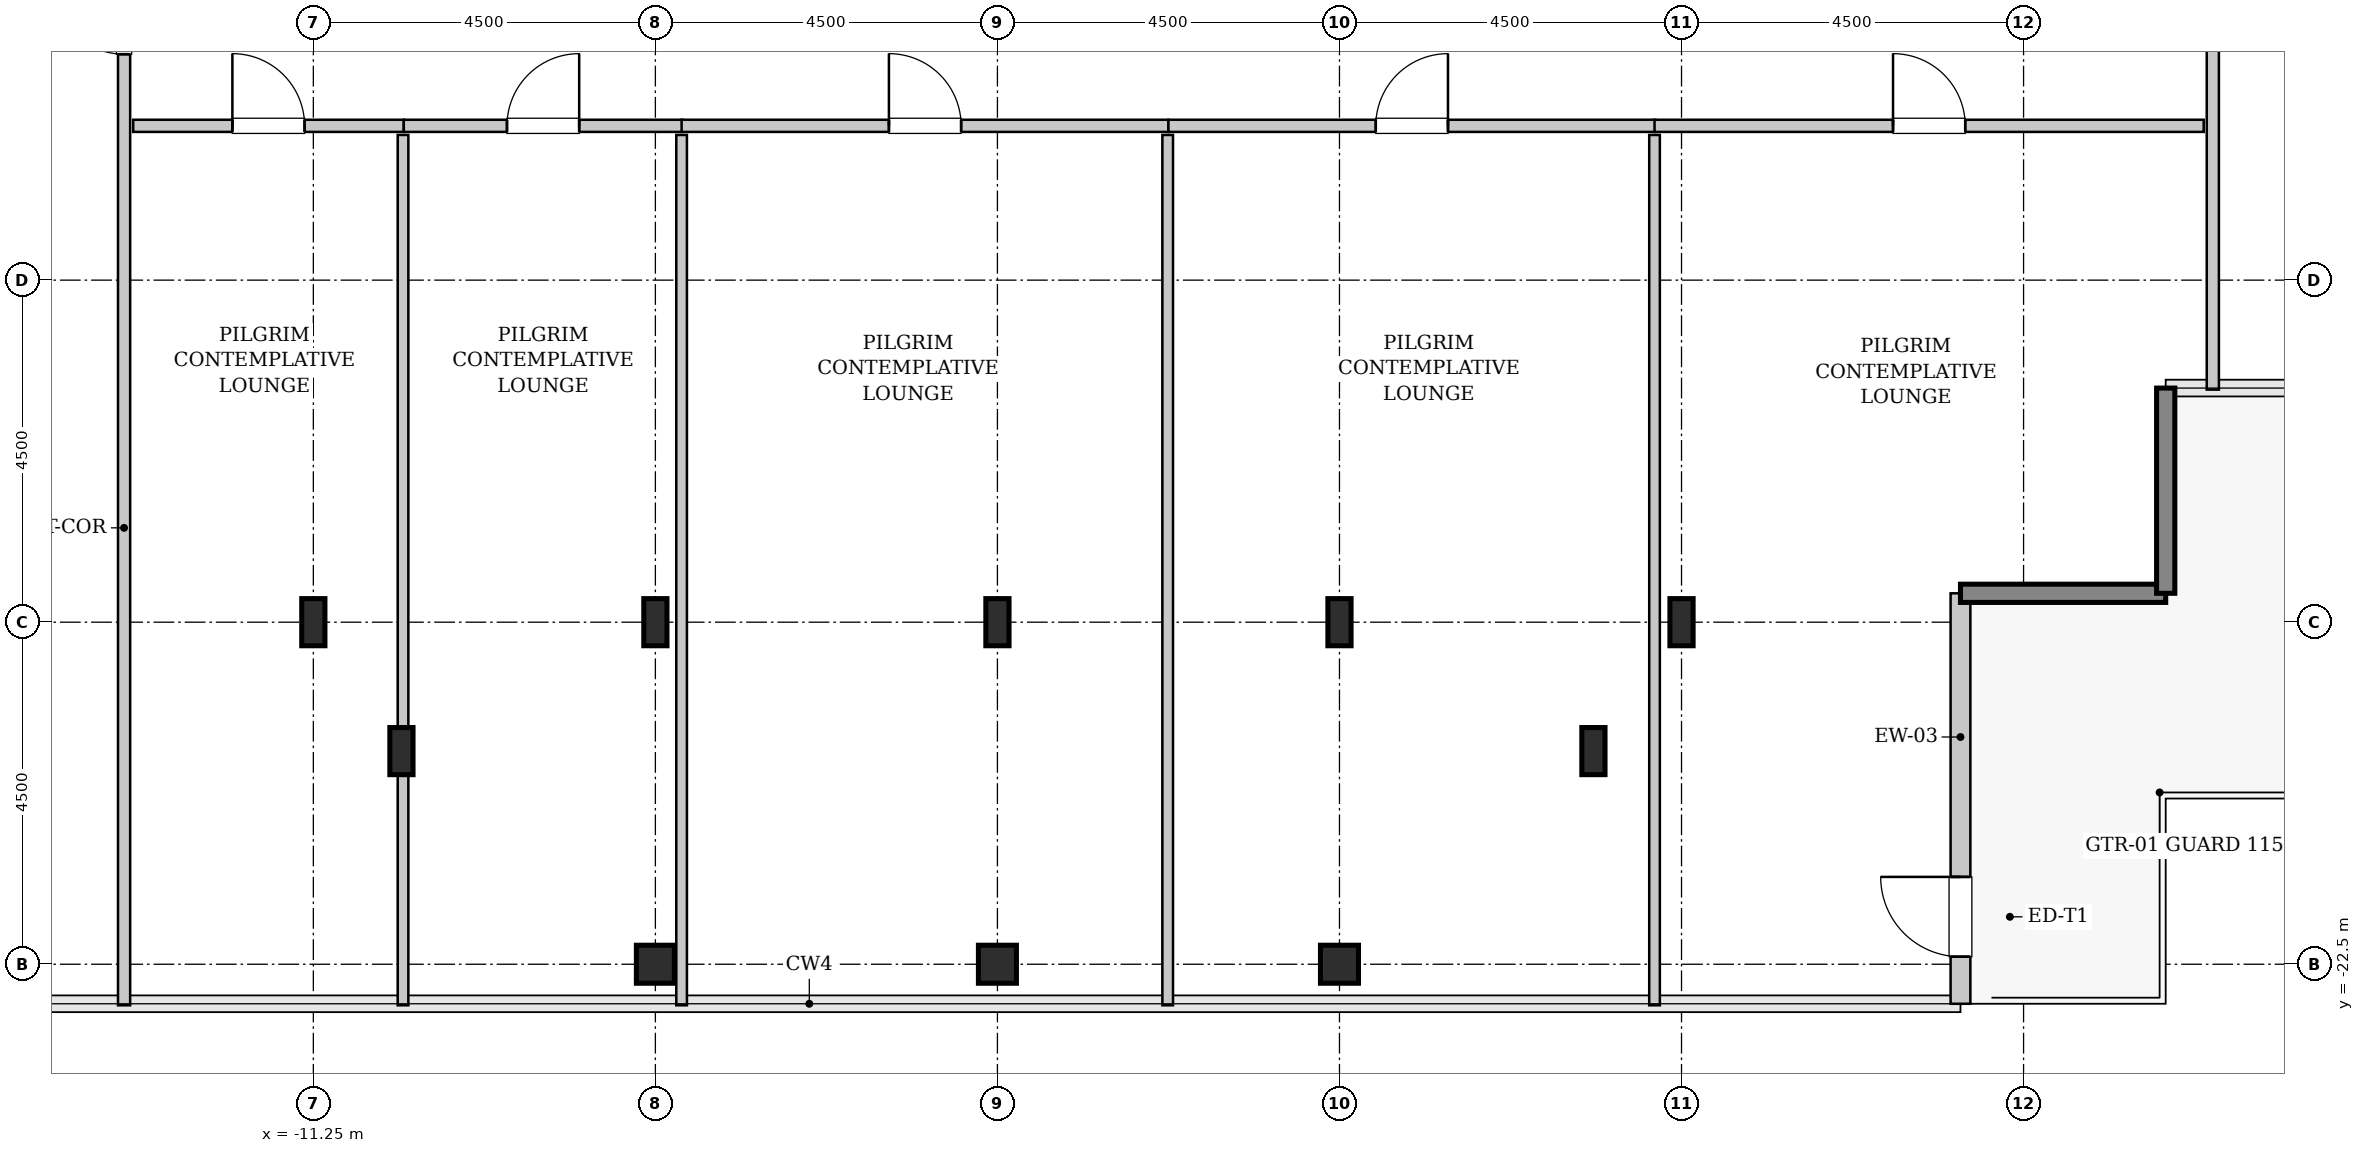
"""IFC4 building model, lengths in metres.
Left out: names, types, materials, properties, quantities, classifications, styles, units other than length and angle.
Written with IfcOpenShell. Run it as: python <this file> out.ifc"""

import sys

from ifc_helpers import new_model, si_unit, direction, frame, frame_2d, origin, origin_2d, place, context, subcontext, project, spatial, rectangle, hollow_rectangle, i_section, extrude, source, transform, mapped, element, fill, save


model = new_model("IFC4")
c1 = context("Model", 3, precision=1e-05, world=origin(), true_north=direction((0.0, 1.0)))
c2 = subcontext(c1, "Body", "Model", "MODEL_VIEW")
j1 = project(units=[si_unit("LENGTHUNIT", "METRE"), si_unit("PLANEANGLEUNIT", "RADIAN")], contexts=[c1])
p1 = place(None, origin())
s1 = spatial("IfcSite", under=j1, at=p1, CompositionType="ELEMENT")
p2 = place(p1, origin())
s2 = spatial("IfcBuilding", under=s1, at=p2, CompositionType="ELEMENT")
p3 = place(p2, frame((0.0, 0.0, 298.8)))
s3 = spatial("IfcBuildingStorey", under=s2, at=p3, CompositionType="ELEMENT", Elevation=298.8)
m1 = source(origin(), c2, "Body", "SweptSolid", [
    extrude(i_section(OverallWidth=0.305, OverallDepth=0.62, WebThickness=0.021, FlangeThickness=0.04, FilletRadius=0.027, at=origin_2d()), origin(), (0.0, 0.0, 1.0), 3.8),
])
for number, where, z_axis, x_axis in (
    (1, (-11.25, -18.0, 0.0), (0.0, 0.0, 1.0), (1.0, 0.0, 0.0)),
    (2, (-10.091, -19.696, 0.0), (0.0, 0.0, 1.0), (1.0, 0.0, 0.0)),
):
    element("IfcColumn", number, at=place(p3, frame(where, z_axis=z_axis, x_axis=x_axis)), inside=s3, PredefinedType="COLUMN", context=c2, shape_type="MappedRepresentation", body=[
        mapped(m1, transform((0.0, 0.0, 0.0), x_axis=(1.0, 0.0, 0.0), y_axis=(0.0, 1.0, 0.0), z_axis=(0.0, 0.0, 1.0), scale=1.0)),
    ])
m2 = source(origin(), c2, "Body", "SweptSolid", [
    extrude(hollow_rectangle(XDim=0.5, YDim=0.5, WallThickness=0.025, InnerFilletRadius=0.025, OuterFilletRadius=0.05, at=origin_2d()), origin(), (0.0, 0.0, 1.0), 3.8),
])
p4 = place(p3, frame((-6.75, -22.5, 0.0), z_axis=(0.0, 0.0, 1.0), x_axis=(1.0, 0.0, 0.0)))
e3 = element("IfcColumn", 3, at=p4, inside=s3, PredefinedType="COLUMN", context=c2, shape_type="MappedRepresentation", body=[
    mapped(m2, transform((0.0, 0.0, 0.0), x_axis=(1.0, 0.0, 0.0), y_axis=(0.0, 1.0, 0.0), z_axis=(0.0, 0.0, 1.0), scale=1.0)),
])
p5 = place(p3, frame((-6.75, -18.0, 0.0), z_axis=(0.0, 0.0, 1.0), x_axis=(1.0, 0.0, 0.0)))
e4 = element("IfcColumn", 4, at=p5, inside=s3, PredefinedType="COLUMN", context=c2, shape_type="MappedRepresentation", body=[
    mapped(m1, transform((0.0, 0.0, 0.0), x_axis=(1.0, 0.0, 0.0), y_axis=(0.0, 1.0, 0.0), z_axis=(0.0, 0.0, 1.0), scale=1.0)),
])
p6 = place(p3, frame((-2.25, -22.5, 0.0), z_axis=(0.0, 0.0, 1.0), x_axis=(1.0, 0.0, 0.0)))
e5 = element("IfcColumn", 5, at=p6, inside=s3, PredefinedType="COLUMN", context=c2, shape_type="MappedRepresentation", body=[
    mapped(m2, transform((0.0, 0.0, 0.0), x_axis=(1.0, 0.0, 0.0), y_axis=(0.0, 1.0, 0.0), z_axis=(0.0, 0.0, 1.0), scale=1.0)),
])
p7 = place(p3, frame((-2.25, -18.0, 0.0), z_axis=(0.0, 0.0, 1.0), x_axis=(1.0, 0.0, 0.0)))
e6 = element("IfcColumn", 6, at=p7, inside=s3, PredefinedType="COLUMN", context=c2, shape_type="MappedRepresentation", body=[
    mapped(m1, transform((0.0, 0.0, 0.0), x_axis=(1.0, 0.0, 0.0), y_axis=(0.0, 1.0, 0.0), z_axis=(0.0, 0.0, 1.0), scale=1.0)),
])
p8 = place(p3, frame((2.25, -22.5, 0.0), z_axis=(0.0, 0.0, 1.0), x_axis=(1.0, 0.0, 0.0)))
e7 = element("IfcColumn", 7, at=p8, inside=s3, PredefinedType="COLUMN", context=c2, shape_type="MappedRepresentation", body=[
    mapped(m2, transform((0.0, 0.0, 0.0), x_axis=(1.0, 0.0, 0.0), y_axis=(0.0, 1.0, 0.0), z_axis=(0.0, 0.0, 1.0), scale=1.0)),
])
for number, where, z_axis, x_axis in (
    (8, (2.25, -18.0, 0.0), (0.0, 0.0, 1.0), (1.0, 0.0, 0.0)),
    (9, (5.591, -19.696, 0.0), (0.0, 0.0, 1.0), (1.0, 0.0, 0.0)),
    (10, (6.75, -18.0, 0.0), (0.0, 0.0, 1.0), (1.0, 0.0, 0.0)),
):
    element("IfcColumn", number, at=place(p3, frame(where, z_axis=z_axis, x_axis=x_axis)), inside=s3, PredefinedType="COLUMN", context=c2, shape_type="MappedRepresentation", body=[
        mapped(m1, transform((0.0, 0.0, 0.0), x_axis=(1.0, 0.0, 0.0), y_axis=(0.0, 1.0, 0.0), z_axis=(0.0, 0.0, 1.0), scale=1.0)),
    ])
m3 = source(origin(), c2, "Body", "SweptSolid", [
    extrude(rectangle(XDim=5.4, YDim=0.26, at=frame_2d((2.7, 0.0))), origin(), (0.0, 0.0, 1.0), 3.55),
])
p9 = place(p3, frame((10.42, -23.02, 0.0), z_axis=(0.0, 0.0, 1.0), x_axis=(0.0, 1.0, 0.0)))
e11 = element("IfcWall", 11, at=p9, inside=s3, PredefinedType="SOLIDWALL", context=c2, shape_type="MappedRepresentation", body=[
    mapped(m3, transform((0.0, 0.0, 0.0), x_axis=(1.0, 0.0, 0.0), y_axis=(0.0, 1.0, 0.0), z_axis=(0.0, 0.0, 1.0), scale=1.0)),
])
p10 = place(p9, frame((0.619, 0.0, 0.0)))
e12 = element("IfcOpeningElement", 12, at=p10, cuts=e11, PredefinedType="OPENING", context=c2, shape_type="SweptSolid", body=[
    extrude(rectangle(XDim=1.05, YDim=2.2, at=frame_2d((0.525, 1.1))), frame((0.0, 0.14, 0.0), z_axis=(0.0, -1.0, 0.0), x_axis=(1.0, 0.0, 0.0)), (0.0, 0.0, 1.0), 0.28),
])
m4 = source(origin(), c2, "Body", "SweptSolid", [
    extrude(rectangle(XDim=2.7, YDim=0.24, at=frame_2d((1.35, 0.0))), origin(), (0.0, 0.0, 1.0), 3.55),
])
for number, where, z_axis, x_axis in (
    (13, (10.42, -17.62, 0.0), (0.0, 0.0, 1.0), (1.0, 0.0, 0.0)),
    (14, (13.12, -17.62, 0.0), (0.0, 0.0, 1.0), (0.0, 1.0, 0.0)),
):
    element("IfcWall", number, at=place(p3, frame(where, z_axis=z_axis, x_axis=x_axis)), inside=s3, PredefinedType="SHEAR", context=c2, shape_type="MappedRepresentation", body=[
        mapped(m4, transform((0.0, 0.0, 0.0), x_axis=(1.0, 0.0, 0.0), y_axis=(0.0, 1.0, 0.0), z_axis=(0.0, 0.0, 1.0), scale=1.0)),
    ])
m5 = source(origin(), c2, "Body", "SweptSolid", [
    extrude(rectangle(XDim=14.445, YDim=0.16, at=frame_2d((7.223, 0.0))), origin(), (0.0, 0.0, 1.0), 3.535),
])
p11 = place(p3, frame((-13.74, -23.04, 0.0), z_axis=(0.0, 0.0, 1.0), x_axis=(0.0, 1.0, 0.0)))
e15 = element("IfcWall", 15, at=p11, inside=s3, PredefinedType="PARTITIONING", context=c2, shape_type="MappedRepresentation", body=[
    mapped(m5, transform((0.0, 0.0, 0.0), x_axis=(1.0, 0.0, 0.0), y_axis=(0.0, 1.0, 0.0), z_axis=(0.0, 0.0, 1.0), scale=1.0)),
])
p12 = place(p11, frame((12.512, 0.0, 0.0)))
e16 = element("IfcOpeningElement", 16, at=p12, cuts=e15, PredefinedType="OPENING", context=c2, shape_type="SweptSolid", body=[
    extrude(rectangle(XDim=0.95, YDim=2.1, at=frame_2d((0.475, 1.05))), frame((0.0, 0.09, 0.0), z_axis=(0.0, -1.0, 0.0), x_axis=(1.0, 0.0, 0.0)), (0.0, 0.0, 1.0), 0.18),
])
m6 = source(origin(), c2, "Body", "SweptSolid", [
    extrude(rectangle(XDim=9.145, YDim=0.16, at=frame_2d((4.573, 0.0))), origin(), (0.0, 0.0, 1.0), 3.535),
])
p13 = place(p3, frame((13.74, -14.94, 0.0), z_axis=(0.0, 0.0, 1.0), x_axis=(0.0, 1.0, 0.0)))
e17 = element("IfcWall", 17, at=p13, inside=s3, PredefinedType="PARTITIONING", context=c2, shape_type="MappedRepresentation", body=[
    mapped(m6, transform((0.0, 0.0, 0.0), x_axis=(1.0, 0.0, 0.0), y_axis=(0.0, 1.0, 0.0), z_axis=(0.0, 0.0, 1.0), scale=1.0)),
])
p14 = place(p13, frame((5.812, 0.0, 0.0)))
e18 = element("IfcOpeningElement", 18, at=p14, cuts=e17, PredefinedType="OPENING", context=c2, shape_type="SweptSolid", body=[
    extrude(rectangle(XDim=0.95, YDim=2.1, at=frame_2d((0.475, 1.05))), frame((0.0, 0.09, 0.0), z_axis=(0.0, -1.0, 0.0), x_axis=(1.0, 0.0, 0.0)), (0.0, 0.0, 1.0), 0.18),
])
m7 = source(origin(), c2, "Body", "SweptSolid", [
    extrude(rectangle(XDim=3.56, YDim=0.16, at=frame_2d((1.78, 0.0))), origin(), (0.0, 0.0, 1.0), 3.535),
])
p15 = place(p3, frame((-13.62, -11.47, 0.0), z_axis=(0.0, 0.0, 1.0), x_axis=(1.0, 0.0, 0.0)))
e19 = element("IfcWall", 19, at=p15, inside=s3, PredefinedType="PARTITIONING", context=c2, shape_type="MappedRepresentation", body=[
    mapped(m7, transform((0.0, 0.0, 0.0), x_axis=(1.0, 0.0, 0.0), y_axis=(0.0, 1.0, 0.0), z_axis=(0.0, 0.0, 1.0), scale=1.0)),
])
p16 = place(p15, frame((1.305, 0.0, 0.0)))
e20 = element("IfcOpeningElement", 20, at=p16, cuts=e19, PredefinedType="OPENING", context=c2, shape_type="SweptSolid", body=[
    extrude(rectangle(XDim=0.95, YDim=2.1, at=frame_2d((0.475, 1.05))), frame((0.0, 0.09, 0.0), z_axis=(0.0, -1.0, 0.0), x_axis=(1.0, 0.0, 0.0)), (0.0, 0.0, 1.0), 0.18),
])
m8 = source(origin(), c2, "Body", "SweptSolid", [
    extrude(rectangle(XDim=11.45, YDim=0.14, at=frame_2d((5.725, 0.0))), origin(), (0.0, 0.0, 1.0), 3.535),
])
p17 = place(p3, frame((-10.07, -23.04, 0.0), z_axis=(0.0, 0.0, 1.0), x_axis=(0.0, 1.0, 0.0)))
e21 = element("IfcWall", 21, at=p17, inside=s3, PredefinedType="PARTITIONING", context=c2, shape_type="MappedRepresentation", body=[
    mapped(m8, transform((0.0, 0.0, 0.0), x_axis=(1.0, 0.0, 0.0), y_axis=(0.0, 1.0, 0.0), z_axis=(0.0, 0.0, 1.0), scale=1.0)),
])
m9 = source(origin(), c2, "Body", "SweptSolid", [
    extrude(rectangle(XDim=3.665, YDim=0.16, at=frame_2d((1.833, 0.0))), origin(), (0.0, 0.0, 1.0), 3.535),
])
p18 = place(p3, frame((-10.06, -11.47, 0.0), z_axis=(0.0, 0.0, 1.0), x_axis=(1.0, 0.0, 0.0)))
e22 = element("IfcWall", 22, at=p18, inside=s3, PredefinedType="PARTITIONING", context=c2, shape_type="MappedRepresentation", body=[
    mapped(m9, transform((0.0, 0.0, 0.0), x_axis=(1.0, 0.0, 0.0), y_axis=(0.0, 1.0, 0.0), z_axis=(0.0, 0.0, 1.0), scale=1.0)),
])
p19 = place(p18, frame((1.357, 0.0, 0.0)))
e23 = element("IfcOpeningElement", 23, at=p19, cuts=e22, PredefinedType="OPENING", context=c2, shape_type="SweptSolid", body=[
    extrude(rectangle(XDim=0.95, YDim=2.1, at=frame_2d((0.475, 1.05))), frame((0.0, 0.09, 0.0), z_axis=(0.0, -1.0, 0.0), x_axis=(1.0, 0.0, 0.0)), (0.0, 0.0, 1.0), 0.18),
])
m10 = source(origin(), c2, "Body", "SweptSolid", [
    extrude(rectangle(XDim=11.45, YDim=0.14, at=frame_2d((5.725, 0.0))), origin(), (0.0, 0.0, 1.0), 2.925),
])
p20 = place(p3, frame((-6.405, -23.04, 0.0), z_axis=(0.0, 0.0, 1.0), x_axis=(0.0, 1.0, 0.0)))
e24 = element("IfcWall", 24, at=p20, inside=s3, PredefinedType="PARTITIONING", context=c2, shape_type="MappedRepresentation", body=[
    mapped(m10, transform((0.0, 0.0, 0.0), x_axis=(1.0, 0.0, 0.0), y_axis=(0.0, 1.0, 0.0), z_axis=(0.0, 0.0, 1.0), scale=1.0)),
])
m11 = source(origin(), c2, "Body", "SweptSolid", [
    extrude(rectangle(XDim=6.405, YDim=0.16, at=frame_2d((3.203, 0.0))), origin(), (0.0, 0.0, 1.0), 3.535),
])
p21 = place(p3, frame((-6.405, -11.47, 0.0), z_axis=(0.0, 0.0, 1.0), x_axis=(1.0, 0.0, 0.0)))
e25 = element("IfcWall", 25, at=p21, inside=s3, PredefinedType="PARTITIONING", context=c2, shape_type="MappedRepresentation", body=[
    mapped(m11, transform((0.0, 0.0, 0.0), x_axis=(1.0, 0.0, 0.0), y_axis=(0.0, 1.0, 0.0), z_axis=(0.0, 0.0, 1.0), scale=1.0)),
])
p22 = place(p21, frame((2.728, 0.0, 0.0)))
e26 = element("IfcOpeningElement", 26, at=p22, cuts=e25, PredefinedType="OPENING", context=c2, shape_type="SweptSolid", body=[
    extrude(rectangle(XDim=0.95, YDim=2.1, at=frame_2d((0.475, 1.05))), frame((0.0, 0.09, 0.0), z_axis=(0.0, -1.0, 0.0), x_axis=(1.0, 0.0, 0.0)), (0.0, 0.0, 1.0), 0.18),
])
p23 = place(p3, frame((-0.01, -23.04, 0.0), z_axis=(0.0, 0.0, 1.0), x_axis=(0.0, 1.0, 0.0)))
e27 = element("IfcWall", 27, at=p23, inside=s3, PredefinedType="PARTITIONING", context=c2, shape_type="MappedRepresentation", body=[
    mapped(m8, transform((0.0, 0.0, 0.0), x_axis=(1.0, 0.0, 0.0), y_axis=(0.0, 1.0, 0.0), z_axis=(0.0, 0.0, 1.0), scale=1.0)),
])
p24 = place(p3, frame((0.0, -11.47, 0.0), z_axis=(0.0, 0.0, 1.0), x_axis=(1.0, 0.0, 0.0)))
e28 = element("IfcWall", 28, at=p24, inside=s3, PredefinedType="PARTITIONING", context=c2, shape_type="MappedRepresentation", body=[
    mapped(m11, transform((0.0, 0.0, 0.0), x_axis=(1.0, 0.0, 0.0), y_axis=(0.0, 1.0, 0.0), z_axis=(0.0, 0.0, 1.0), scale=1.0)),
])
p25 = place(p24, frame((2.728, 0.0, 0.0)))
e29 = element("IfcOpeningElement", 29, at=p25, cuts=e28, PredefinedType="OPENING", context=c2, shape_type="SweptSolid", body=[
    extrude(rectangle(XDim=0.95, YDim=2.1, at=frame_2d((0.475, 1.05))), frame((0.0, 0.09, 0.0), z_axis=(0.0, -1.0, 0.0), x_axis=(1.0, 0.0, 0.0)), (0.0, 0.0, 1.0), 0.18),
])
p26 = place(p3, frame((6.395, -23.04, 0.0), z_axis=(0.0, 0.0, 1.0), x_axis=(0.0, 1.0, 0.0)))
e30 = element("IfcWall", 30, at=p26, inside=s3, PredefinedType="PARTITIONING", context=c2, shape_type="MappedRepresentation", body=[
    mapped(m8, transform((0.0, 0.0, 0.0), x_axis=(1.0, 0.0, 0.0), y_axis=(0.0, 1.0, 0.0), z_axis=(0.0, 0.0, 1.0), scale=1.0)),
])
m12 = source(origin(), c2, "Body", "SweptSolid", [
    extrude(rectangle(XDim=7.225, YDim=0.16, at=frame_2d((3.613, 0.0))), origin(), (0.0, 0.0, 1.0), 3.535),
])
p27 = place(p3, frame((6.395, -11.47, 0.0), z_axis=(0.0, 0.0, 1.0), x_axis=(1.0, 0.0, 0.0)))
e31 = element("IfcWall", 31, at=p27, inside=s3, PredefinedType="PARTITIONING", context=c2, shape_type="MappedRepresentation", body=[
    mapped(m12, transform((0.0, 0.0, 0.0), x_axis=(1.0, 0.0, 0.0), y_axis=(0.0, 1.0, 0.0), z_axis=(0.0, 0.0, 1.0), scale=1.0)),
])
p28 = place(p27, frame((3.137, 0.0, 0.0)))
e32 = element("IfcOpeningElement", 32, at=p28, cuts=e31, PredefinedType="OPENING", context=c2, shape_type="SweptSolid", body=[
    extrude(rectangle(XDim=0.95, YDim=2.1, at=frame_2d((0.475, 1.05))), frame((0.0, 0.09, 0.0), z_axis=(0.0, -1.0, 0.0), x_axis=(1.0, 0.0, 0.0)), (0.0, 0.0, 1.0), 0.18),
])
m13 = source(origin(), c2, "Body", "SweptSolid", [
    extrude(rectangle(XDim=1.05, YDim=2.2, at=frame_2d((0.525, 1.1))), frame((0.0, 0.025, 0.0), z_axis=(0.0, -1.0, 0.0), x_axis=(1.0, 0.0, 0.0)), (0.0, 0.0, 1.0), 0.05),
])
p29 = place(p10, origin())
e33 = element("IfcDoor", 33, at=p29, inside=s3, OperationType="SINGLE_SWING_RIGHT", PredefinedType="DOOR", context=c2, shape_type="MappedRepresentation", body=[
    mapped(m13, transform((0.0, 0.0, 0.0), x_axis=(1.0, 0.0, 0.0), y_axis=(0.0, 1.0, 0.0), z_axis=(0.0, 0.0, 1.0), scale=1.0)),
])
fill(e12, e33)
m14 = source(origin(), c2, "Body", "SweptSolid", [
    extrude(rectangle(XDim=0.95, YDim=2.1, at=frame_2d((0.475, 1.05))), frame((0.0, 0.025, 0.0), z_axis=(0.0, -1.0, 0.0), x_axis=(1.0, 0.0, 0.0)), (0.0, 0.0, 1.0), 0.05),
])
p30 = place(p12, origin())
e34 = element("IfcDoor", 34, at=p30, inside=s3, OperationType="SINGLE_SWING_RIGHT", PredefinedType="DOOR", context=c2, shape_type="MappedRepresentation", body=[
    mapped(m14, transform((0.0, 0.0, 0.0), x_axis=(1.0, 0.0, 0.0), y_axis=(0.0, 1.0, 0.0), z_axis=(0.0, 0.0, 1.0), scale=1.0)),
])
fill(e16, e34)
p31 = place(p16, origin())
e35 = element("IfcDoor", 35, at=p31, inside=s3, OperationType="SINGLE_SWING_LEFT", PredefinedType="DOOR", context=c2, shape_type="MappedRepresentation", body=[
    mapped(m14, transform((0.0, 0.0, 0.0), x_axis=(1.0, 0.0, 0.0), y_axis=(0.0, 1.0, 0.0), z_axis=(0.0, 0.0, 1.0), scale=1.0)),
])
fill(e20, e35)
p32 = place(p19, origin())
e36 = element("IfcDoor", 36, at=p32, inside=s3, OperationType="SINGLE_SWING_RIGHT", PredefinedType="DOOR", context=c2, shape_type="MappedRepresentation", body=[
    mapped(m14, transform((0.0, 0.0, 0.0), x_axis=(1.0, 0.0, 0.0), y_axis=(0.0, 1.0, 0.0), z_axis=(0.0, 0.0, 1.0), scale=1.0)),
])
fill(e23, e36)
p33 = place(p22, origin())
e37 = element("IfcDoor", 37, at=p33, inside=s3, OperationType="SINGLE_SWING_LEFT", PredefinedType="DOOR", context=c2, shape_type="MappedRepresentation", body=[
    mapped(m14, transform((0.0, 0.0, 0.0), x_axis=(1.0, 0.0, 0.0), y_axis=(0.0, 1.0, 0.0), z_axis=(0.0, 0.0, 1.0), scale=1.0)),
])
fill(e26, e37)
p34 = place(p25, origin())
e38 = element("IfcDoor", 38, at=p34, inside=s3, OperationType="SINGLE_SWING_RIGHT", PredefinedType="DOOR", context=c2, shape_type="MappedRepresentation", body=[
    mapped(m14, transform((0.0, 0.0, 0.0), x_axis=(1.0, 0.0, 0.0), y_axis=(0.0, 1.0, 0.0), z_axis=(0.0, 0.0, 1.0), scale=1.0)),
])
fill(e29, e38)
p35 = place(p28, origin())
e39 = element("IfcDoor", 39, at=p35, inside=s3, OperationType="SINGLE_SWING_LEFT", PredefinedType="DOOR", context=c2, shape_type="MappedRepresentation", body=[
    mapped(m14, transform((0.0, 0.0, 0.0), x_axis=(1.0, 0.0, 0.0), y_axis=(0.0, 1.0, 0.0), z_axis=(0.0, 0.0, 1.0), scale=1.0)),
])
fill(e32, e39)
save(model, sys.argv[1])
